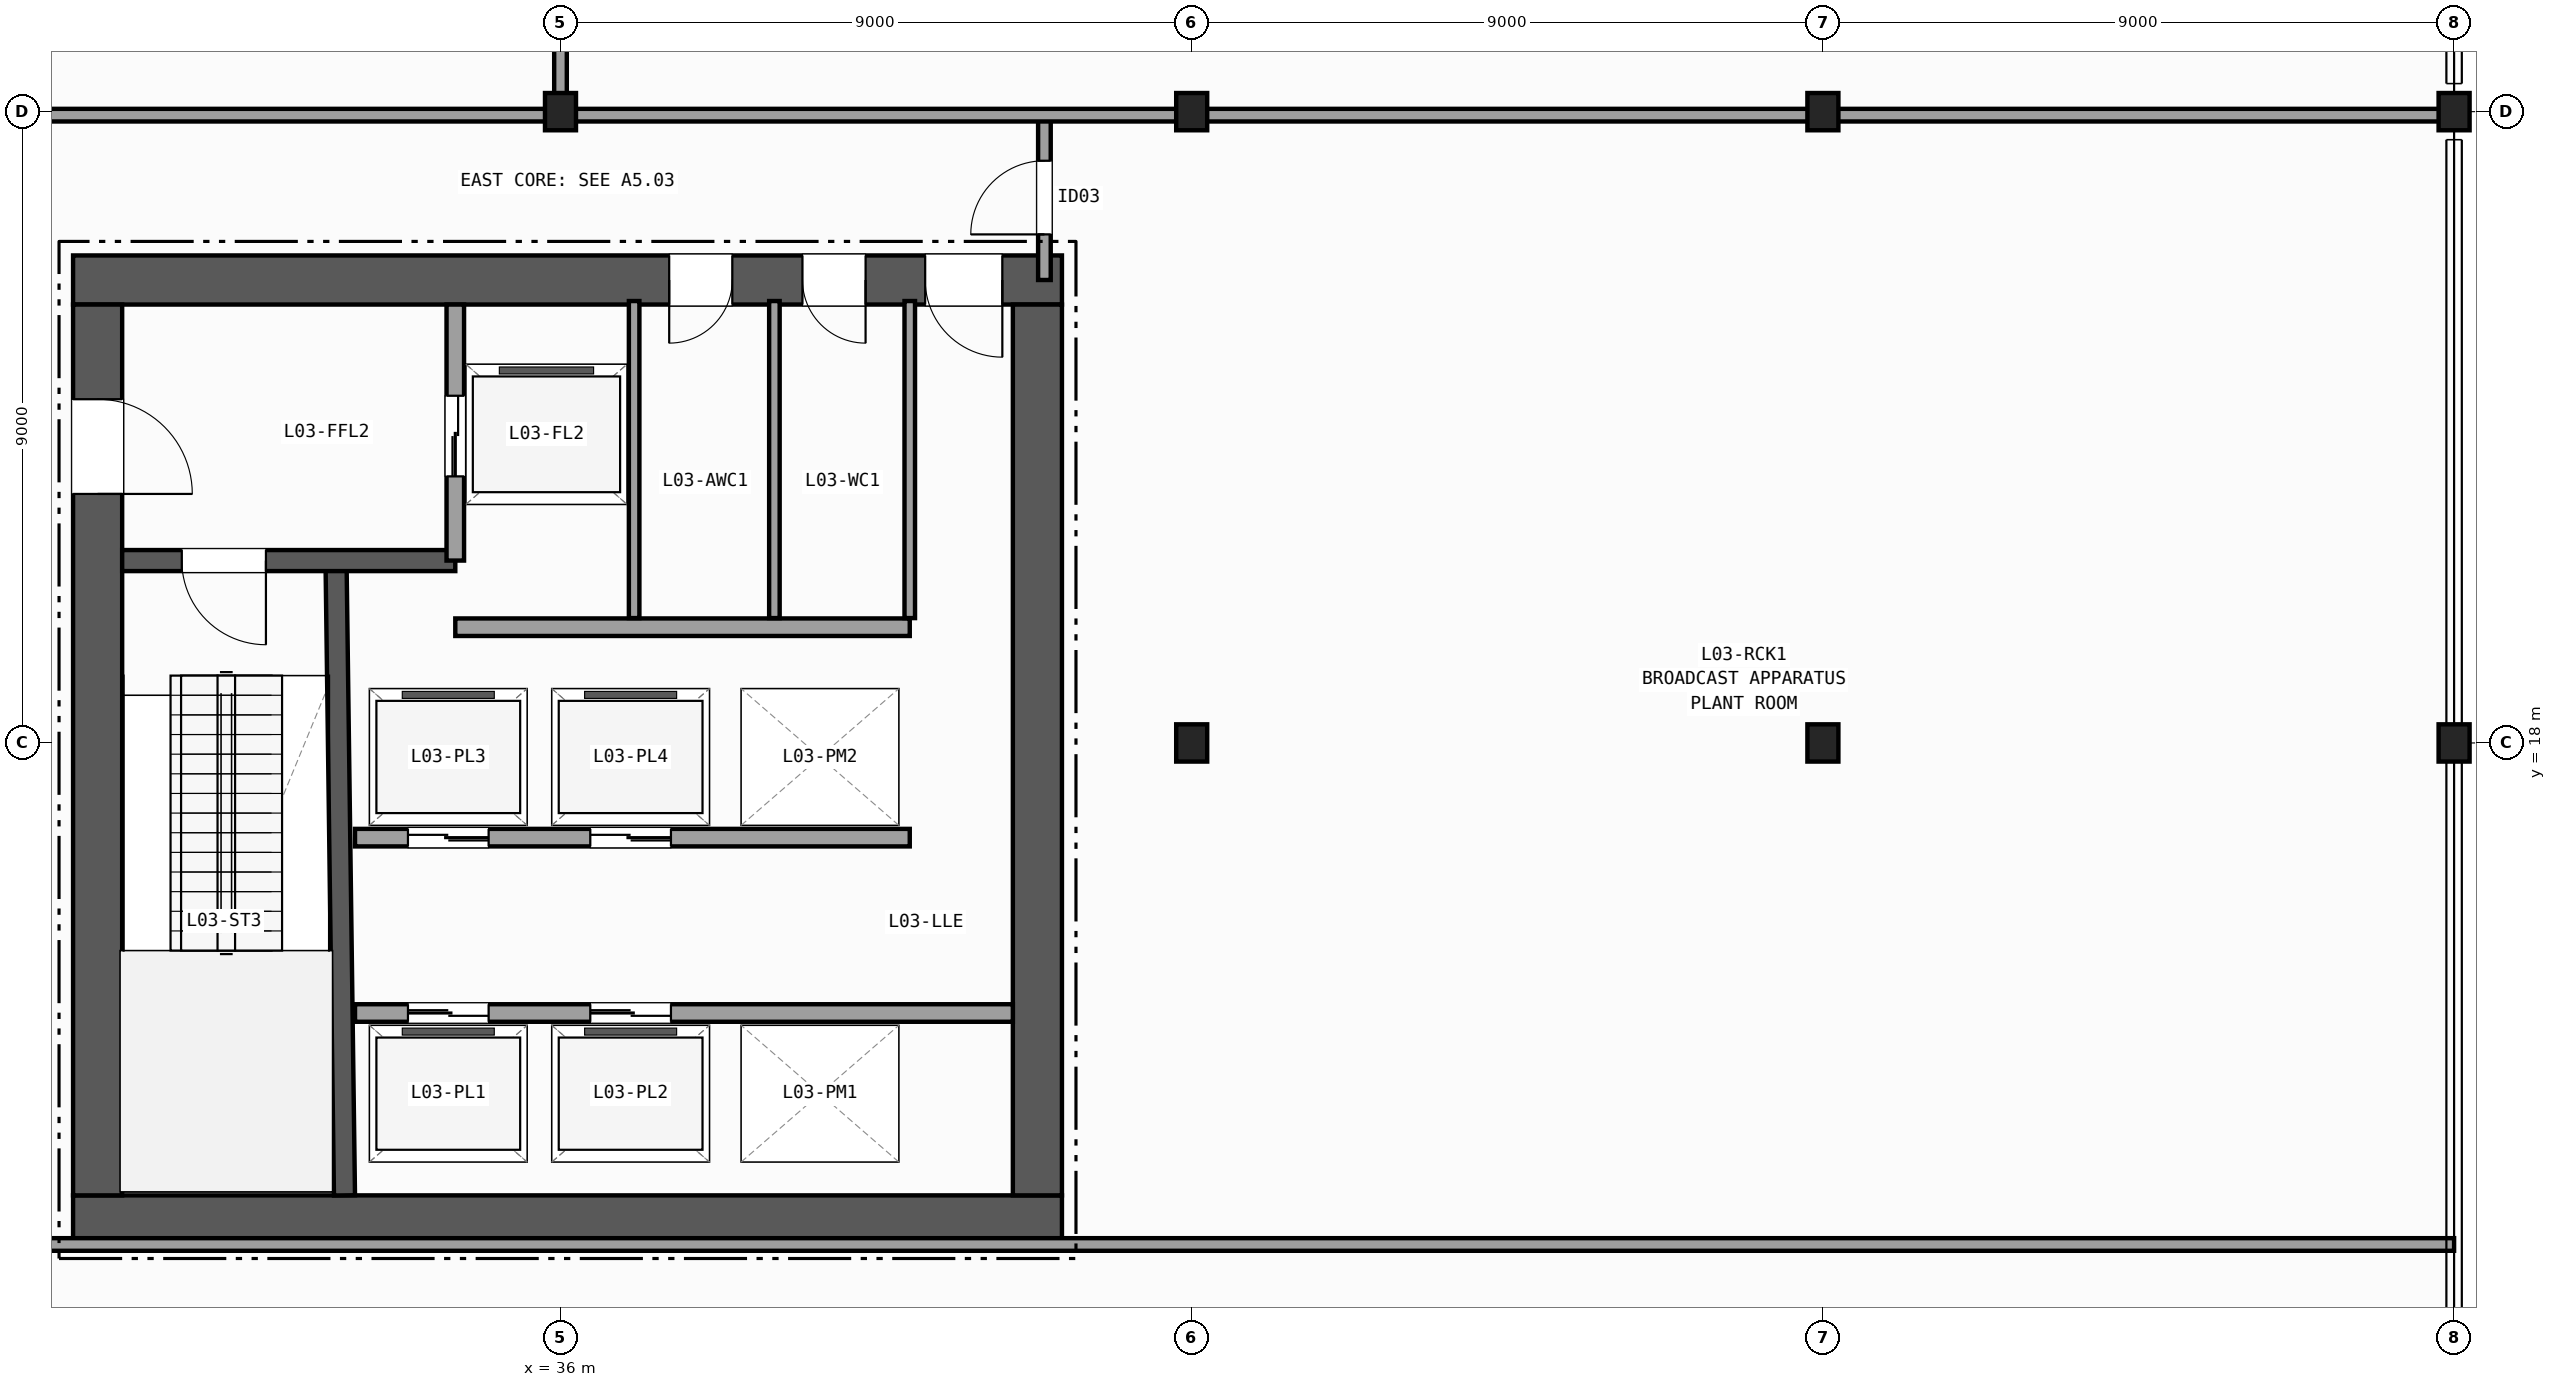
"""IFC4 building model, lengths in metres.
Left out: names, types, materials, properties, quantities, classifications, styles, units other than length and angle.
Written with IfcOpenShell. Run it as: python <this file> out.ifc"""

import sys

from ifc_helpers import new_model, si_unit, direction, frame, frame_2d, origin, origin_2d, place, context, subcontext, project, spatial, rectangle, i_section, extrude, element, fill, save


model = new_model("IFC4")
c1 = context("Model", 3, precision=1e-05, world=origin(), true_north=direction((0.0, 1.0)))
c2 = subcontext(c1, "Body", "Model", "MODEL_VIEW")
j1 = project(units=[si_unit("LENGTHUNIT", "METRE"), si_unit("PLANEANGLEUNIT", "RADIAN")], contexts=[c1])
p1 = place(None, origin())
s1 = spatial("IfcSite", under=j1, at=p1, CompositionType="ELEMENT")
p2 = place(p1, origin())
s2 = spatial("IfcBuilding", under=s1, at=p2, CompositionType="ELEMENT")
p3 = place(p2, frame((0.0, 0.0, 16.2)))
s3 = spatial("IfcBuildingStorey", under=s2, at=p3, CompositionType="ELEMENT", Elevation=16.2)
for number, where, z_axis, x_axis in (
    (1, (36.0, 27.0, 0.0), (0.0, 0.0, 1.0), (1.0, 0.0, 0.0)),
    (2, (45.0, 18.0, 0.0), (0.0, 0.0, 1.0), (1.0, 0.0, 0.0)),
    (3, (45.0, 27.0, 0.0), (0.0, 0.0, 1.0), (1.0, 0.0, 0.0)),
    (4, (54.0, 18.0, 0.0), (0.0, 0.0, 1.0), (1.0, 0.0, 0.0)),
    (5, (54.0, 27.0, 0.0), (0.0, 0.0, 1.0), (1.0, 0.0, 0.0)),
    (6, (63.0, 18.0, 0.0), (0.0, 0.0, 1.0), (1.0, 0.0, 0.0)),
    (7, (63.0, 27.0, 0.0), (0.0, 0.0, 1.0), (1.0, 0.0, 0.0)),
):
    element("IfcColumn", number, at=place(p3, frame(where, z_axis=z_axis, x_axis=x_axis)), inside=s3, PredefinedType="COLUMN", context=c2, shape_type="SweptSolid", body=[
        extrude(i_section(OverallWidth=0.442, OverallDepth=0.531, WebThickness=0.066, FlangeThickness=0.106, FilletRadius=0.015, at=origin_2d()), origin(), (0.0, 0.0, 1.0), 5.0),
    ])
p4 = place(p3, frame((29.05, 11.2, 0.0), z_axis=(0.0, 0.0, 1.0), x_axis=(1.0, 0.0, 0.0)))
e8 = element("IfcWall", 8, at=p4, inside=s3, PredefinedType="SHEAR", context=c2, shape_type="SweptSolid", body=[
    extrude(rectangle(XDim=14.1, YDim=0.7, at=frame_2d((7.05, 0.0))), origin(), (0.0, 0.0, 1.0), 4.68),
])
p5 = place(p3, frame((43.15, 24.6, 0.0), z_axis=(0.0, 0.0, 1.0), x_axis=(-1.0, 0.0, 0.0)))
e9 = element("IfcWall", 9, at=p5, inside=s3, PredefinedType="SHEAR", context=c2, shape_type="SweptSolid", body=[
    extrude(rectangle(XDim=14.1, YDim=0.7, at=frame_2d((7.05, 0.0))), origin(), (0.0, 0.0, 1.0), 4.68),
])
p6 = place(p5, frame((0.85, 0.0, 0.0)))
e10 = element("IfcOpeningElement", 10, at=p6, cuts=e9, PredefinedType="OPENING", context=c2, shape_type="SweptSolid", body=[
    extrude(rectangle(XDim=1.1, YDim=2.15, at=frame_2d((0.55, 1.075))), frame((0.0, 0.36, 0.0), z_axis=(0.0, -1.0, 0.0), x_axis=(1.0, 0.0, 0.0)), (0.0, 0.0, 1.0), 0.72),
])
p7 = place(p5, frame((2.8, 0.0, 0.0)))
e11 = element("IfcOpeningElement", 11, at=p7, cuts=e9, PredefinedType="OPENING", context=c2, shape_type="SweptSolid", body=[
    extrude(rectangle(XDim=0.9, YDim=2.1, at=frame_2d((0.45, 1.05))), frame((0.0, 0.36, 0.0), z_axis=(0.0, -1.0, 0.0), x_axis=(1.0, 0.0, 0.0)), (0.0, 0.0, 1.0), 0.72),
])
p8 = place(p5, frame((4.7, 0.0, 0.0)))
e12 = element("IfcOpeningElement", 12, at=p8, cuts=e9, PredefinedType="OPENING", context=c2, shape_type="SweptSolid", body=[
    extrude(rectangle(XDim=0.9, YDim=2.1, at=frame_2d((0.45, 1.05))), frame((0.0, 0.36, 0.0), z_axis=(0.0, -1.0, 0.0), x_axis=(1.0, 0.0, 0.0)), (0.0, 0.0, 1.0), 0.72),
])
p9 = place(p3, frame((29.4, 24.25, 0.0), z_axis=(0.0, 0.0, 1.0), x_axis=(0.0, -1.0, 0.0)))
e13 = element("IfcWall", 13, at=p9, inside=s3, PredefinedType="SHEAR", context=c2, shape_type="SweptSolid", body=[
    extrude(rectangle(XDim=12.7, YDim=0.7, at=frame_2d((6.35, 0.0))), origin(), (0.0, 0.0, 1.0), 4.68),
])
p10 = place(p9, frame((1.35, 0.0, 0.0)))
e14 = element("IfcOpeningElement", 14, at=p10, cuts=e13, PredefinedType="OPENING", context=c2, shape_type="SweptSolid", body=[
    extrude(rectangle(XDim=1.35, YDim=2.15, at=frame_2d((0.675, 1.075))), frame((0.0, 0.36, 0.0), z_axis=(0.0, -1.0, 0.0), x_axis=(1.0, 0.0, 0.0)), (0.0, 0.0, 1.0), 0.72),
])
p11 = place(p3, frame((42.8, 11.55, 0.0), z_axis=(0.0, 0.0, 1.0), x_axis=(0.0, 1.0, 0.0)))
e15 = element("IfcWall", 15, at=p11, inside=s3, PredefinedType="SHEAR", context=c2, shape_type="SweptSolid", body=[
    extrude(rectangle(XDim=12.7, YDim=0.7, at=frame_2d((6.35, 0.0))), origin(), (0.0, 0.0, 1.0), 4.68),
])
p12 = place(p3, frame((32.92, 11.55, 0.0), z_axis=(0.0, 0.0, 1.0), x_axis=(-0.01331804616, 0.99991131089, 0.0)))
e16 = element("IfcWall", 16, at=p12, inside=s3, PredefinedType="SHEAR", context=c2, shape_type="SweptSolid", body=[
    extrude(rectangle(XDim=9.001, YDim=0.3, at=frame_2d((4.5, 0.0))), origin(), (0.0, 0.0, 1.0), 4.68),
])
p13 = place(p3, frame((34.5, 20.6, 0.0), z_axis=(0.0, 0.0, 1.0), x_axis=(-1.0, 0.0, 0.0)))
e17 = element("IfcWall", 17, at=p13, inside=s3, PredefinedType="SHEAR", context=c2, shape_type="SweptSolid", body=[
    extrude(rectangle(XDim=4.75, YDim=0.3, at=frame_2d((2.375, 0.0))), origin(), (0.0, 0.0, 1.0), 4.68),
])
p14 = place(p13, frame((2.7, 0.0, 0.0)))
e18 = element("IfcOpeningElement", 18, at=p14, cuts=e17, PredefinedType="OPENING", context=c2, shape_type="SweptSolid", body=[
    extrude(rectangle(XDim=1.2, YDim=2.15, at=frame_2d((0.6, 1.075))), frame((0.0, 0.16, 0.0), z_axis=(0.0, -1.0, 0.0), x_axis=(1.0, 0.0, 0.0)), (0.0, 0.0, 1.0), 0.32),
])
p15 = place(p3, frame((34.5, 20.6, 0.0), z_axis=(0.0, 0.0, 1.0), x_axis=(0.0, 1.0, 0.0)))
e19 = element("IfcWall", 19, at=p15, inside=s3, PredefinedType="PARTITIONING", context=c2, shape_type="SweptSolid", body=[
    extrude(rectangle(XDim=3.65, YDim=0.25, at=frame_2d((1.825, 0.0))), origin(), (0.0, 0.0, 1.0), 4.68),
])
p16 = place(p15, frame((1.2, 0.0, 0.0)))
e20 = element("IfcOpeningElement", 20, at=p16, cuts=e19, PredefinedType="OPENING", context=c2, shape_type="SweptSolid", body=[
    extrude(rectangle(XDim=1.15, YDim=2.15, at=frame_2d((0.575, 1.075))), frame((0.0, 0.135, 0.0), z_axis=(0.0, -1.0, 0.0), x_axis=(1.0, 0.0, 0.0)), (0.0, 0.0, 1.0), 0.27),
])
p17 = place(p3, frame((34.5, 19.65, 0.0), z_axis=(0.0, 0.0, 1.0), x_axis=(1.0, 0.0, 0.0)))
e21 = element("IfcWall", 21, at=p17, inside=s3, PredefinedType="PARTITIONING", context=c2, shape_type="SweptSolid", body=[
    extrude(rectangle(XDim=6.48, YDim=0.25, at=frame_2d((3.24, 0.0))), origin(), (0.0, 0.0, 1.0), 4.68),
])
p18 = place(p3, frame((33.07, 14.15, 0.0), z_axis=(0.0, 0.0, 1.0), x_axis=(1.0, 0.0, 0.0)))
e22 = element("IfcWall", 22, at=p18, inside=s3, PredefinedType="PARTITIONING", context=c2, shape_type="SweptSolid", body=[
    extrude(rectangle(XDim=9.38, YDim=0.25, at=frame_2d((4.69, 0.0))), origin(), (0.0, 0.0, 1.0), 4.68),
])
p19 = place(p18, frame((0.755, 0.0, 0.0)))
e23 = element("IfcOpeningElement", 23, at=p19, cuts=e22, PredefinedType="OPENING", context=c2, shape_type="SweptSolid", body=[
    extrude(rectangle(XDim=1.15, YDim=2.15, at=frame_2d((0.575, 1.075))), frame((0.0, 0.135, 0.0), z_axis=(0.0, -1.0, 0.0), x_axis=(1.0, 0.0, 0.0)), (0.0, 0.0, 1.0), 0.27),
])
p20 = place(p18, frame((3.355, 0.0, 0.0)))
e24 = element("IfcOpeningElement", 24, at=p20, cuts=e22, PredefinedType="OPENING", context=c2, shape_type="SweptSolid", body=[
    extrude(rectangle(XDim=1.15, YDim=2.15, at=frame_2d((0.575, 1.075))), frame((0.0, 0.135, 0.0), z_axis=(0.0, -1.0, 0.0), x_axis=(1.0, 0.0, 0.0)), (0.0, 0.0, 1.0), 0.27),
])
p21 = place(p3, frame((40.98, 16.65, 0.0), z_axis=(0.0, 0.0, 1.0), x_axis=(-1.0, 0.0, 0.0)))
e25 = element("IfcWall", 25, at=p21, inside=s3, PredefinedType="PARTITIONING", context=c2, shape_type="SweptSolid", body=[
    extrude(rectangle(XDim=7.91, YDim=0.25, at=frame_2d((3.955, 0.0))), origin(), (0.0, 0.0, 1.0), 4.68),
])
p22 = place(p21, frame((6.005, 0.0, 0.0)))
e26 = element("IfcOpeningElement", 26, at=p22, cuts=e25, PredefinedType="OPENING", context=c2, shape_type="SweptSolid", body=[
    extrude(rectangle(XDim=1.15, YDim=2.15, at=frame_2d((0.575, 1.075))), frame((0.0, 0.135, 0.0), z_axis=(0.0, -1.0, 0.0), x_axis=(1.0, 0.0, 0.0)), (0.0, 0.0, 1.0), 0.27),
])
p23 = place(p21, frame((3.405, 0.0, 0.0)))
e27 = element("IfcOpeningElement", 27, at=p23, cuts=e25, PredefinedType="OPENING", context=c2, shape_type="SweptSolid", body=[
    extrude(rectangle(XDim=1.15, YDim=2.15, at=frame_2d((0.575, 1.075))), frame((0.0, 0.135, 0.0), z_axis=(0.0, -1.0, 0.0), x_axis=(1.0, 0.0, 0.0)), (0.0, 0.0, 1.0), 0.27),
])
for number, where, z_axis, x_axis in (
    (28, (37.05, 19.78, 0.0), (0.0, 0.0, 1.0), (0.0, 1.0, 0.0)),
    (29, (39.05, 19.78, 0.0), (0.0, 0.0, 1.0), (0.0, 1.0, 0.0)),
    (30, (40.98, 19.78, 0.0), (0.0, 0.0, 1.0), (0.0, 1.0, 0.0)),
):
    element("IfcWall", number, at=place(p3, frame(where, z_axis=z_axis, x_axis=x_axis)), inside=s3, PredefinedType="PARTITIONING", context=c2, shape_type="SweptSolid", body=[
        extrude(rectangle(XDim=4.52, YDim=0.15, at=frame_2d((2.26, 0.0))), origin(), (0.0, 0.0, 1.0), 4.68),
    ])
p24 = place(p3, frame((24.65, 10.85, 0.0), z_axis=(0.0, 0.0, 1.0), x_axis=(1.0, 0.0, 0.0)))
e31 = element("IfcWall", 31, at=p24, inside=s3, PredefinedType="PARTITIONING", context=c2, shape_type="SweptSolid", body=[
    extrude(rectangle(XDim=38.35, YDim=0.18, at=frame_2d((19.175, 0.0))), origin(), (0.0, 0.0, 1.0), 3.805),
])
p25 = place(p24, frame((2.0, 0.0, 0.0)))
e32 = element("IfcOpeningElement", 32, at=p25, cuts=e31, PredefinedType="OPENING", context=c2, shape_type="SweptSolid", body=[
    extrude(rectangle(XDim=1.2, YDim=2.15, at=frame_2d((0.6, 1.075))), frame((0.0, 0.1, 0.0), z_axis=(0.0, -1.0, 0.0), x_axis=(1.0, 0.0, 0.0)), (0.0, 0.0, 1.0), 0.2),
])
p26 = place(p3, frame((42.9, 24.6, 0.0), z_axis=(0.0, 0.0, 1.0), x_axis=(0.0, 1.0, 0.0)))
e33 = element("IfcWall", 33, at=p26, inside=s3, PredefinedType="PARTITIONING", context=c2, shape_type="SweptSolid", body=[
    extrude(rectangle(XDim=2.35, YDim=0.18, at=frame_2d((1.175, 0.0))), origin(), (0.0, 0.0, 1.0), 3.733),
])
p27 = place(p26, frame((0.65, 0.0, 0.0)))
e34 = element("IfcOpeningElement", 34, at=p27, cuts=e33, PredefinedType="OPENING", context=c2, shape_type="SweptSolid", body=[
    extrude(rectangle(XDim=1.05, YDim=2.15, at=frame_2d((0.525, 1.075))), frame((0.0, 0.1, 0.0), z_axis=(0.0, -1.0, 0.0), x_axis=(1.0, 0.0, 0.0)), (0.0, 0.0, 1.0), 0.2),
])
p28 = place(p3, frame((27.1, 26.95, 0.0), z_axis=(0.0, 0.0, 1.0), x_axis=(1.0, 0.0, 0.0)))
e35 = element("IfcWall", 35, at=p28, inside=s3, PredefinedType="PARTITIONING", context=c2, shape_type="SweptSolid", body=[
    extrude(rectangle(XDim=35.9, YDim=0.18, at=frame_2d((17.95, 0.0))), origin(), (0.0, 0.0, 1.0), 3.733),
])
p29 = place(p3, frame((36.0, 26.95, 0.0), z_axis=(0.0, 0.0, 1.0), x_axis=(0.0, 1.0, 0.0)))
e36 = element("IfcWall", 36, at=p29, inside=s3, PredefinedType="PARTITIONING", context=c2, shape_type="SweptSolid", body=[
    extrude(rectangle(XDim=27.05, YDim=0.18, at=frame_2d((13.525, 0.0))), origin(), (0.0, 0.0, 1.0), 3.733),
])
p30 = place(p29, frame((4.5, 0.0, 0.0)))
e37 = element("IfcOpeningElement", 37, at=p30, cuts=e36, PredefinedType="OPENING", context=c2, shape_type="SweptSolid", body=[
    extrude(rectangle(XDim=0.95, YDim=2.1, at=frame_2d((0.475, 1.05))), frame((0.0, 0.1, 0.0), z_axis=(0.0, -1.0, 0.0), x_axis=(1.0, 0.0, 0.0)), (0.0, 0.0, 1.0), 0.2),
])
p31 = place(p14, origin())
e38 = element("IfcDoor", 38, at=p31, inside=s3, OperationType="SINGLE_SWING_LEFT", PredefinedType="DOOR", context=c2, shape_type="SweptSolid", body=[
    extrude(rectangle(XDim=1.2, YDim=2.15, at=frame_2d((0.6, 1.075))), frame((0.0, 0.025, 0.0), z_axis=(0.0, -1.0, 0.0), x_axis=(1.0, 0.0, 0.0)), (0.0, 0.0, 1.0), 0.05),
])
fill(e18, e38)
p32 = place(p10, origin())
e39 = element("IfcDoor", 39, at=p32, inside=s3, OperationType="SINGLE_SWING_RIGHT", PredefinedType="DOOR", context=c2, shape_type="SweptSolid", body=[
    extrude(rectangle(XDim=1.35, YDim=2.15, at=frame_2d((0.675, 1.075))), frame((0.0, 0.025, 0.0), z_axis=(0.0, -1.0, 0.0), x_axis=(1.0, 0.0, 0.0)), (0.0, 0.0, 1.0), 0.05),
])
fill(e14, e39)
p33 = place(p6, origin())
e40 = element("IfcDoor", 40, at=p33, inside=s3, OperationType="SINGLE_SWING_LEFT", PredefinedType="DOOR", context=c2, shape_type="SweptSolid", body=[
    extrude(rectangle(XDim=1.1, YDim=2.15, at=frame_2d((0.55, 1.075))), frame((0.0, 0.025, 0.0), z_axis=(0.0, -1.0, 0.0), x_axis=(1.0, 0.0, 0.0)), (0.0, 0.0, 1.0), 0.05),
])
fill(e10, e40)
p34 = place(p7, origin())
e41 = element("IfcDoor", 41, at=p34, inside=s3, OperationType="SINGLE_SWING_LEFT", PredefinedType="DOOR", context=c2, shape_type="SweptSolid", body=[
    extrude(rectangle(XDim=0.9, YDim=2.1, at=frame_2d((0.45, 1.05))), frame((0.0, 0.025, 0.0), z_axis=(0.0, -1.0, 0.0), x_axis=(1.0, 0.0, 0.0)), (0.0, 0.0, 1.0), 0.05),
])
fill(e11, e41)
p35 = place(p8, origin())
e42 = element("IfcDoor", 42, at=p35, inside=s3, OperationType="SINGLE_SWING_RIGHT", PredefinedType="DOOR", context=c2, shape_type="SweptSolid", body=[
    extrude(rectangle(XDim=0.9, YDim=2.1, at=frame_2d((0.45, 1.05))), frame((0.0, 0.025, 0.0), z_axis=(0.0, -1.0, 0.0), x_axis=(1.0, 0.0, 0.0)), (0.0, 0.0, 1.0), 0.05),
])
fill(e12, e42)
p36 = place(p16, origin())
e43 = element("IfcDoor", 43, at=p36, inside=s3, OperationType="DOUBLE_DOOR_SLIDING", PredefinedType="DOOR", context=c2, shape_type="SweptSolid", body=[
    extrude(rectangle(XDim=1.15, YDim=2.15, at=frame_2d((0.575, 1.075))), frame((0.0, 0.025, 0.0), z_axis=(0.0, -1.0, 0.0), x_axis=(1.0, 0.0, 0.0)), (0.0, 0.0, 1.0), 0.05),
])
fill(e20, e43)
p37 = place(p19, origin())
e44 = element("IfcDoor", 44, at=p37, inside=s3, OperationType="DOUBLE_DOOR_SLIDING", PredefinedType="DOOR", context=c2, shape_type="SweptSolid", body=[
    extrude(rectangle(XDim=1.15, YDim=2.15, at=frame_2d((0.575, 1.075))), frame((0.0, 0.025, 0.0), z_axis=(0.0, -1.0, 0.0), x_axis=(1.0, 0.0, 0.0)), (0.0, 0.0, 1.0), 0.05),
])
fill(e23, e44)
p38 = place(p20, origin())
e45 = element("IfcDoor", 45, at=p38, inside=s3, OperationType="DOUBLE_DOOR_SLIDING", PredefinedType="DOOR", context=c2, shape_type="SweptSolid", body=[
    extrude(rectangle(XDim=1.15, YDim=2.15, at=frame_2d((0.575, 1.075))), frame((0.0, 0.025, 0.0), z_axis=(0.0, -1.0, 0.0), x_axis=(1.0, 0.0, 0.0)), (0.0, 0.0, 1.0), 0.05),
])
fill(e24, e45)
p39 = place(p22, origin())
e46 = element("IfcDoor", 46, at=p39, inside=s3, OperationType="DOUBLE_DOOR_SLIDING", PredefinedType="DOOR", context=c2, shape_type="SweptSolid", body=[
    extrude(rectangle(XDim=1.15, YDim=2.15, at=frame_2d((0.575, 1.075))), frame((0.0, 0.025, 0.0), z_axis=(0.0, -1.0, 0.0), x_axis=(1.0, 0.0, 0.0)), (0.0, 0.0, 1.0), 0.05),
])
fill(e26, e46)
p40 = place(p23, origin())
e47 = element("IfcDoor", 47, at=p40, inside=s3, OperationType="DOUBLE_DOOR_SLIDING", PredefinedType="DOOR", context=c2, shape_type="SweptSolid", body=[
    extrude(rectangle(XDim=1.15, YDim=2.15, at=frame_2d((0.575, 1.075))), frame((0.0, 0.025, 0.0), z_axis=(0.0, -1.0, 0.0), x_axis=(1.0, 0.0, 0.0)), (0.0, 0.0, 1.0), 0.05),
])
fill(e27, e47)
p41 = place(p27, origin())
e48 = element("IfcDoor", 48, at=p41, inside=s3, OperationType="SINGLE_SWING_LEFT", PredefinedType="DOOR", context=c2, shape_type="SweptSolid", body=[
    extrude(rectangle(XDim=1.05, YDim=2.15, at=frame_2d((0.525, 1.075))), frame((0.0, 0.025, 0.0), z_axis=(0.0, -1.0, 0.0), x_axis=(1.0, 0.0, 0.0)), (0.0, 0.0, 1.0), 0.05),
])
fill(e34, e48)
save(model, sys.argv[1])
